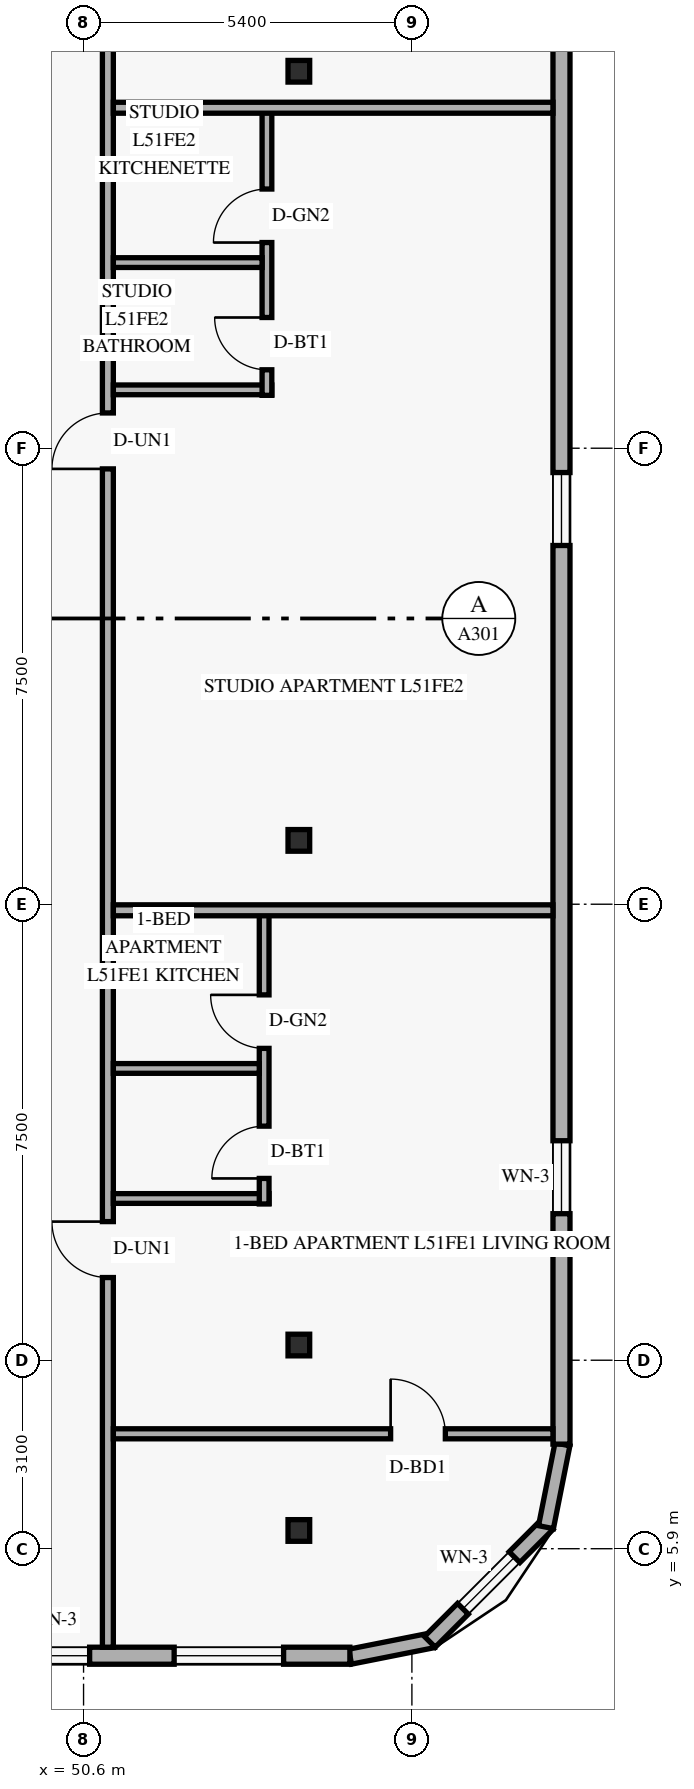
"""IFC4 building model, lengths in metres.
Left out: names, types, materials, properties, quantities, classifications, styles, units other than length and angle.
Written with IfcOpenShell. Run it as: python <this file> out.ifc"""

import sys

from ifc_helpers import new_model, si_unit, direction, frame, frame_2d, origin, origin_2d, place, context, subcontext, project, spatial, rectangle, hollow_rectangle, extrude, element, fill, save


model = new_model("IFC4")
c1 = context("Model", 3, precision=1e-05, world=origin(), true_north=direction((0.0, 1.0)))
c2 = subcontext(c1, "Body", "Model", "MODEL_VIEW")
j1 = project(units=[si_unit("LENGTHUNIT", "METRE"), si_unit("PLANEANGLEUNIT", "RADIAN")], contexts=[c1])
p1 = place(None, origin())
s1 = spatial("IfcSite", under=j1, at=p1, CompositionType="ELEMENT")
p2 = place(p1, origin())
s2 = spatial("IfcBuilding", under=s1, at=p2, CompositionType="ELEMENT")
p3 = place(p2, frame((0.0, 0.0, 196.2)))
s3 = spatial("IfcBuildingStorey", under=s2, at=p3, CompositionType="ELEMENT", Elevation=196.2)
for number, where, z_axis, x_axis in (
    (1, (54.036, 6.2, 0.0), (0.058, 0.0, 0.998), (0.0, 1.0, 0.0)),
    (2, (54.036, 9.25, 0.0), (0.058, 0.0, 0.998), (0.0, 1.0, 0.0)),
    (3, (54.036, 17.55, 0.0), (0.058, 0.0, 0.998), (0.0, 1.0, 0.0)),
    (4, (54.036, 30.2, 0.0), (0.058, 0.0, 0.998), (0.0, 1.0, 0.0)),
):
    element("IfcColumn", number, at=place(p3, frame(where, z_axis=z_axis, x_axis=x_axis)), inside=s3, PredefinedType="COLUMN", context=c2, shape_type="SweptSolid", body=[
        extrude(hollow_rectangle(XDim=0.356, YDim=0.356, WallThickness=0.016, at=origin_2d()), origin(), (0.0, 0.0, 1.0), 3.606),
    ])
p4 = place(p3, frame((54.983, 4.124, 0.0), z_axis=(0.0, 0.0, 1.0), x_axis=(0.980809899341, 0.19496651342, 0.0)))
e5 = element("IfcWall", 5, at=p4, inside=s3, PredefinedType="SOLIDWALL", context=c2, shape_type="SweptSolid", body=[
    extrude(rectangle(XDim=1.389, YDim=0.25, at=frame_2d((0.694, 0.0))), origin(), (0.0, 0.0, 1.0), 3.3),
])
p5 = place(p3, frame((56.295, 4.368, 0.0), z_axis=(0.0, 0.0, 1.0), x_axis=(0.707106781187, 0.707106781187, 0.0)))
e6 = element("IfcWall", 6, at=p5, inside=s3, PredefinedType="SOLIDWALL", context=c2, shape_type="SweptSolid", body=[
    extrude(rectangle(XDim=2.739, YDim=0.25, at=frame_2d((1.37, 0.0))), origin(), (0.0, 0.0, 1.0), 3.3),
])
p6 = place(p5, frame((0.77, 0.0, 0.85)))
e7 = element("IfcOpeningElement", 7, at=p6, cuts=e6, PredefinedType="OPENING", context=c2, shape_type="SweptSolid", body=[
    extrude(rectangle(XDim=1.2, YDim=1.5, at=frame_2d((0.6, 0.75))), frame((0.0, 0.135, 0.0), z_axis=(0.0, -1.0, 0.0), x_axis=(1.0, 0.0, 0.0)), (0.0, 0.0, 1.0), 0.27),
])
p7 = place(p3, frame((58.205, 6.254, 0.0), z_axis=(0.0, 0.0, 1.0), x_axis=(0.19496651342, 0.980809899341, 0.0)))
e8 = element("IfcWall", 8, at=p7, inside=s3, PredefinedType="SOLIDWALL", context=c2, shape_type="SweptSolid", body=[
    extrude(rectangle(XDim=1.389, YDim=0.25, at=frame_2d((0.694, 0.0))), origin(), (0.0, 0.0, 1.0), 3.3),
])
p8 = place(p3, frame((21.22, 4.14, 0.0), z_axis=(0.0, 0.0, 1.0), x_axis=(1.0, 0.0, 0.0)))
e9 = element("IfcWall", 9, at=p8, inside=s3, PredefinedType="SOLIDWALL", context=c2, shape_type="SweptSolid", body=[
    extrude(rectangle(XDim=33.76, YDim=0.28, at=frame_2d((16.88, 0.0))), origin(), (0.0, 0.0, 1.0), 3.3),
])
p9 = place(p8, frame((2.605, 0.0, 0.85)))
e10 = element("IfcOpeningElement", 10, at=p9, cuts=e9, PredefinedType="OPENING", context=c2, shape_type="SweptSolid", body=[
    extrude(rectangle(XDim=1.8, YDim=1.6, at=frame_2d((0.9, 0.8))), frame((0.0, 0.15, 0.0), z_axis=(0.0, -1.0, 0.0), x_axis=(1.0, 0.0, 0.0)), (0.0, 0.0, 1.0), 0.3),
])
p10 = place(p8, frame((9.49, 0.0, 0.85)))
e11 = element("IfcOpeningElement", 11, at=p10, cuts=e9, PredefinedType="OPENING", context=c2, shape_type="SweptSolid", body=[
    extrude(rectangle(XDim=1.8, YDim=1.6, at=frame_2d((0.9, 0.8))), frame((0.0, 0.15, 0.0), z_axis=(0.0, -1.0, 0.0), x_axis=(1.0, 0.0, 0.0)), (0.0, 0.0, 1.0), 0.3),
])
p11 = place(p8, frame((14.765, 0.0, 0.85)))
e12 = element("IfcOpeningElement", 12, at=p11, cuts=e9, PredefinedType="OPENING", context=c2, shape_type="SweptSolid", body=[
    extrude(rectangle(XDim=1.8, YDim=1.6, at=frame_2d((0.9, 0.8))), frame((0.0, 0.15, 0.0), z_axis=(0.0, -1.0, 0.0), x_axis=(1.0, 0.0, 0.0)), (0.0, 0.0, 1.0), 0.3),
])
p12 = place(p8, frame((19.16, 0.0, 0.85)))
e13 = element("IfcOpeningElement", 13, at=p12, cuts=e9, PredefinedType="OPENING", context=c2, shape_type="SweptSolid", body=[
    extrude(rectangle(XDim=1.8, YDim=1.6, at=frame_2d((0.9, 0.8))), frame((0.0, 0.15, 0.0), z_axis=(0.0, -1.0, 0.0), x_axis=(1.0, 0.0, 0.0)), (0.0, 0.0, 1.0), 0.3),
])
p13 = place(p8, frame((24.585, 0.0, 0.85)))
e14 = element("IfcOpeningElement", 14, at=p13, cuts=e9, PredefinedType="OPENING", context=c2, shape_type="SweptSolid", body=[
    extrude(rectangle(XDim=1.8, YDim=1.6, at=frame_2d((0.9, 0.8))), frame((0.0, 0.15, 0.0), z_axis=(0.0, -1.0, 0.0), x_axis=(1.0, 0.0, 0.0)), (0.0, 0.0, 1.0), 0.3),
])
p14 = place(p8, frame((28.28, 0.0, 0.85)))
e15 = element("IfcOpeningElement", 15, at=p14, cuts=e9, PredefinedType="OPENING", context=c2, shape_type="SweptSolid", body=[
    extrude(rectangle(XDim=1.2, YDim=1.5, at=frame_2d((0.6, 0.75))), frame((0.0, 0.15, 0.0), z_axis=(0.0, -1.0, 0.0), x_axis=(1.0, 0.0, 0.0)), (0.0, 0.0, 1.0), 0.3),
])
p15 = place(p8, frame((30.87, 0.0, 0.85)))
e16 = element("IfcOpeningElement", 16, at=p15, cuts=e9, PredefinedType="OPENING", context=c2, shape_type="SweptSolid", body=[
    extrude(rectangle(XDim=1.8, YDim=1.6, at=frame_2d((0.9, 0.8))), frame((0.0, 0.15, 0.0), z_axis=(0.0, -1.0, 0.0), x_axis=(1.0, 0.0, 0.0)), (0.0, 0.0, 1.0), 0.3),
])
p16 = place(p3, frame((58.46, 7.62, 0.0), z_axis=(0.0, 0.0, 1.0), x_axis=(0.0, 1.0, 0.0)))
e17 = element("IfcWall", 17, at=p16, inside=s3, PredefinedType="SOLIDWALL", context=c2, shape_type="SweptSolid", body=[
    extrude(rectangle(XDim=32.76, YDim=0.28, at=frame_2d((16.38, 0.0))), origin(), (0.0, 0.0, 1.0), 3.3),
])
p17 = place(p16, frame((3.79, 0.0, 0.85)))
e18 = element("IfcOpeningElement", 18, at=p17, cuts=e17, PredefinedType="OPENING", context=c2, shape_type="SweptSolid", body=[
    extrude(rectangle(XDim=1.2, YDim=1.5, at=frame_2d((0.6, 0.75))), frame((0.0, 0.15, 0.0), z_axis=(0.0, -1.0, 0.0), x_axis=(1.0, 0.0, 0.0)), (0.0, 0.0, 1.0), 0.3),
])
p18 = place(p16, frame((14.78, 0.0, 0.85)))
e19 = element("IfcOpeningElement", 19, at=p18, cuts=e17, PredefinedType="OPENING", context=c2, shape_type="SweptSolid", body=[
    extrude(rectangle(XDim=1.2, YDim=1.5, at=frame_2d((0.6, 0.75))), frame((0.0, 0.15, 0.0), z_axis=(0.0, -1.0, 0.0), x_axis=(1.0, 0.0, 0.0)), (0.0, 0.0, 1.0), 0.3),
])
p19 = place(p16, frame((26.77, 0.0, 0.85)))
e20 = element("IfcOpeningElement", 20, at=p19, cuts=e17, PredefinedType="OPENING", context=c2, shape_type="SweptSolid", body=[
    extrude(rectangle(XDim=1.2, YDim=1.5, at=frame_2d((0.6, 0.75))), frame((0.0, 0.15, 0.0), z_axis=(0.0, -1.0, 0.0), x_axis=(1.0, 0.0, 0.0)), (0.0, 0.0, 1.0), 0.3),
])
p20 = place(p3, frame((51.0, 4.28, 0.0), z_axis=(0.0, 0.0, 1.0), x_axis=(0.0, 1.0, 0.0)))
e21 = element("IfcWall", 21, at=p20, inside=s3, PredefinedType="STANDARD", context=c2, shape_type="SweptSolid", body=[
    extrude(rectangle(XDim=39.44, YDim=0.18, at=frame_2d((19.72, 0.0))), origin(), (0.0, 0.0, 1.0), 2.67),
])
p21 = place(p20, frame((6.08, 0.0, 0.0)))
e22 = element("IfcOpeningElement", 22, at=p21, cuts=e21, PredefinedType="OPENING", context=c2, shape_type="SweptSolid", body=[
    extrude(rectangle(XDim=0.92, YDim=2.15, at=frame_2d((0.46, 1.075))), frame((0.0, 0.1, 0.0), z_axis=(0.0, -1.0, 0.0), x_axis=(1.0, 0.0, 0.0)), (0.0, 0.0, 1.0), 0.2),
])
p22 = place(p20, frame((19.38, 0.0, 0.0)))
e23 = element("IfcOpeningElement", 23, at=p22, cuts=e21, PredefinedType="OPENING", context=c2, shape_type="SweptSolid", body=[
    extrude(rectangle(XDim=0.92, YDim=2.15, at=frame_2d((0.46, 1.075))), frame((0.0, 0.1, 0.0), z_axis=(0.0, -1.0, 0.0), x_axis=(1.0, 0.0, 0.0)), (0.0, 0.0, 1.0), 0.2),
])
p23 = place(p20, frame((31.534, 0.0, 0.0)))
e24 = element("IfcOpeningElement", 24, at=p23, cuts=e21, PredefinedType="OPENING", context=c2, shape_type="SweptSolid", body=[
    extrude(rectangle(XDim=0.92, YDim=2.15, at=frame_2d((0.46, 1.075))), frame((0.0, 0.1, 0.0), z_axis=(0.0, -1.0, 0.0), x_axis=(1.0, 0.0, 0.0)), (0.0, 0.0, 1.0), 0.2),
])
p24 = place(p3, frame((51.09, 7.79, 0.0), z_axis=(0.0, 0.0, 1.0), x_axis=(1.0, 0.0, 0.0)))
e25 = element("IfcWall", 25, at=p24, inside=s3, PredefinedType="PARTITIONING", context=c2, shape_type="SweptSolid", body=[
    extrude(rectangle(XDim=7.23, YDim=0.165, at=frame_2d((3.615, 0.0))), origin(), (0.0, 0.0, 1.0), 2.819),
])
p25 = place(p24, frame((4.56, 0.0, 0.0)))
e26 = element("IfcOpeningElement", 26, at=p25, cuts=e25, PredefinedType="OPENING", context=c2, shape_type="SweptSolid", body=[
    extrude(rectangle(XDim=0.9, YDim=2.14, at=frame_2d((0.45, 1.07))), frame((0.0, 0.093, 0.0), z_axis=(0.0, -1.0, 0.0), x_axis=(1.0, 0.0, 0.0)), (0.0, 0.0, 1.0), 0.185),
])
p26 = place(p3, frame((51.09, 11.66, 0.0), z_axis=(0.0, 0.0, 1.0), x_axis=(1.0, 0.0, 0.0)))
e27 = element("IfcWall", 27, at=p26, inside=s3, PredefinedType="PLUMBINGWALL", context=c2, shape_type="SweptSolid", body=[
    extrude(rectangle(XDim=2.56, YDim=0.16, at=frame_2d((1.28, 0.0))), origin(), (0.0, 0.0, 1.0), 3.3),
])
p27 = place(p3, frame((53.57, 11.57, 0.0), z_axis=(0.0, 0.0, 1.0), x_axis=(0.0, 1.0, 0.0)))
e28 = element("IfcWall", 28, at=p27, inside=s3, PredefinedType="PLUMBINGWALL", context=c2, shape_type="SweptSolid", body=[
    extrude(rectangle(XDim=4.83, YDim=0.16, at=frame_2d((2.415, 0.0))), origin(), (0.0, 0.0, 1.0), 2.924),
])
p28 = place(p27, frame((0.42, 0.0, 0.0)))
e29 = element("IfcOpeningElement", 29, at=p28, cuts=e28, PredefinedType="OPENING", context=c2, shape_type="SweptSolid", body=[
    extrude(rectangle(XDim=0.86, YDim=2.12, at=frame_2d((0.43, 1.06))), frame((0.0, 0.09, 0.0), z_axis=(0.0, -1.0, 0.0), x_axis=(1.0, 0.0, 0.0)), (0.0, 0.0, 1.0), 0.18),
])
p29 = place(p27, frame((2.559, 0.0, 0.0)))
e30 = element("IfcOpeningElement", 30, at=p29, cuts=e28, PredefinedType="OPENING", context=c2, shape_type="SweptSolid", body=[
    extrude(rectangle(XDim=0.88, YDim=2.12, at=frame_2d((0.44, 1.06))), frame((0.0, 0.09, 0.0), z_axis=(0.0, -1.0, 0.0), x_axis=(1.0, 0.0, 0.0)), (0.0, 0.0, 1.0), 0.18),
])
p30 = place(p3, frame((51.09, 13.799, 0.0), z_axis=(0.0, 0.0, 1.0), x_axis=(1.0, 0.0, 0.0)))
e31 = element("IfcWall", 31, at=p30, inside=s3, PredefinedType="PLUMBINGWALL", context=c2, shape_type="SweptSolid", body=[
    extrude(rectangle(XDim=2.4, YDim=0.16, at=frame_2d((1.2, 0.0))), origin(), (0.0, 0.0, 1.0), 3.3),
])
p31 = place(p3, frame((51.09, 16.4, 0.0), z_axis=(0.0, 0.0, 1.0), x_axis=(1.0, 0.0, 0.0)))
e32 = element("IfcWall", 32, at=p31, inside=s3, PredefinedType="PARTITIONING", context=c2, shape_type="SweptSolid", body=[
    extrude(rectangle(XDim=7.23, YDim=0.18, at=frame_2d((3.615, 0.0))), origin(), (0.0, 0.0, 1.0), 2.819),
])
p32 = place(p3, frame((51.09, 24.96, 0.0), z_axis=(0.0, 0.0, 1.0), x_axis=(1.0, 0.0, 0.0)))
e33 = element("IfcWall", 33, at=p32, inside=s3, PredefinedType="PLUMBINGWALL", context=c2, shape_type="SweptSolid", body=[
    extrude(rectangle(XDim=2.606, YDim=0.16, at=frame_2d((1.303, 0.0))), origin(), (0.0, 0.0, 1.0), 2.743),
])
p33 = place(p3, frame((53.616, 24.87, 0.0), z_axis=(0.0, 0.0, 1.0), x_axis=(0.0, 1.0, 0.0)))
e34 = element("IfcWall", 34, at=p33, inside=s3, PredefinedType="PLUMBINGWALL", context=c2, shape_type="SweptSolid", body=[
    extrude(rectangle(XDim=4.73, YDim=0.16, at=frame_2d((2.365, 0.0))), origin(), (0.0, 0.0, 1.0), 2.743),
])
p34 = place(p33, frame((0.42, 0.0, 0.0)))
e35 = element("IfcOpeningElement", 35, at=p34, cuts=e34, PredefinedType="OPENING", context=c2, shape_type="SweptSolid", body=[
    extrude(rectangle(XDim=0.86, YDim=2.12, at=frame_2d((0.43, 1.06))), frame((0.0, 0.09, 0.0), z_axis=(0.0, -1.0, 0.0), x_axis=(1.0, 0.0, 0.0)), (0.0, 0.0, 1.0), 0.18),
])
p35 = place(p33, frame((2.513, 0.0, 0.0)))
e36 = element("IfcOpeningElement", 36, at=p35, cuts=e34, PredefinedType="OPENING", context=c2, shape_type="SweptSolid", body=[
    extrude(rectangle(XDim=0.88, YDim=2.12, at=frame_2d((0.44, 1.06))), frame((0.0, 0.09, 0.0), z_axis=(0.0, -1.0, 0.0), x_axis=(1.0, 0.0, 0.0)), (0.0, 0.0, 1.0), 0.18),
])
p36 = place(p3, frame((51.09, 27.053, 0.0), z_axis=(0.0, 0.0, 1.0), x_axis=(1.0, 0.0, 0.0)))
e37 = element("IfcWall", 37, at=p36, inside=s3, PredefinedType="PLUMBINGWALL", context=c2, shape_type="SweptSolid", body=[
    extrude(rectangle(XDim=2.446, YDim=0.16, at=frame_2d((1.223, 0.0))), origin(), (0.0, 0.0, 1.0), 2.743),
])
p37 = place(p3, frame((51.09, 29.6, 0.0), z_axis=(0.0, 0.0, 1.0), x_axis=(1.0, 0.0, 0.0)))
e38 = element("IfcWall", 38, at=p37, inside=s3, PredefinedType="PARTITIONING", context=c2, shape_type="SweptSolid", body=[
    extrude(rectangle(XDim=7.23, YDim=0.18, at=frame_2d((3.615, 0.0))), origin(), (0.0, 0.0, 1.0), 2.743),
])
p38 = place(p6, origin())
e39 = element("IfcWindow", 39, at=p38, inside=s3, PartitioningType="SINGLE_PANEL", PredefinedType="WINDOW", context=c2, shape_type="SweptSolid", body=[
    extrude(rectangle(XDim=1.2, YDim=1.5, at=frame_2d((0.6, 0.75))), frame((0.0, 0.03, 0.0), z_axis=(0.0, -1.0, 0.0), x_axis=(1.0, 0.0, 0.0)), (0.0, 0.0, 1.0), 0.06),
])
fill(e7, e39)
p39 = place(p14, origin())
e40 = element("IfcWindow", 40, at=p39, inside=s3, PartitioningType="SINGLE_PANEL", PredefinedType="WINDOW", context=c2, shape_type="SweptSolid", body=[
    extrude(rectangle(XDim=1.2, YDim=1.5, at=frame_2d((0.6, 0.75))), frame((0.0, 0.03, 0.0), z_axis=(0.0, -1.0, 0.0), x_axis=(1.0, 0.0, 0.0)), (0.0, 0.0, 1.0), 0.06),
])
fill(e15, e40)
p40 = place(p15, origin())
e41 = element("IfcWindow", 41, at=p40, inside=s3, PartitioningType="SINGLE_PANEL", PredefinedType="WINDOW", context=c2, shape_type="SweptSolid", body=[
    extrude(rectangle(XDim=1.8, YDim=1.6, at=frame_2d((0.9, 0.8))), frame((0.0, 0.03, 0.0), z_axis=(0.0, -1.0, 0.0), x_axis=(1.0, 0.0, 0.0)), (0.0, 0.0, 1.0), 0.06),
])
fill(e16, e41)
p41 = place(p17, origin())
e42 = element("IfcWindow", 42, at=p41, inside=s3, PartitioningType="SINGLE_PANEL", PredefinedType="WINDOW", context=c2, shape_type="SweptSolid", body=[
    extrude(rectangle(XDim=1.2, YDim=1.5, at=frame_2d((0.6, 0.75))), frame((0.0, 0.03, 0.0), z_axis=(0.0, -1.0, 0.0), x_axis=(1.0, 0.0, 0.0)), (0.0, 0.0, 1.0), 0.06),
])
fill(e18, e42)
p42 = place(p18, origin())
e43 = element("IfcWindow", 43, at=p42, inside=s3, PartitioningType="SINGLE_PANEL", PredefinedType="WINDOW", context=c2, shape_type="SweptSolid", body=[
    extrude(rectangle(XDim=1.2, YDim=1.5, at=frame_2d((0.6, 0.75))), frame((0.0, 0.03, 0.0), z_axis=(0.0, -1.0, 0.0), x_axis=(1.0, 0.0, 0.0)), (0.0, 0.0, 1.0), 0.06),
])
fill(e19, e43)
p43 = place(p21, origin())
e44 = element("IfcDoor", 44, at=p43, inside=s3, OperationType="SINGLE_SWING_RIGHT", PredefinedType="DOOR", context=c2, shape_type="SweptSolid", body=[
    extrude(rectangle(XDim=0.92, YDim=2.15, at=frame_2d((0.46, 1.075))), frame((0.0, 0.025, 0.0), z_axis=(0.0, -1.0, 0.0), x_axis=(1.0, 0.0, 0.0)), (0.0, 0.0, 1.0), 0.05),
])
fill(e22, e44)
p44 = place(p28, origin())
e45 = element("IfcDoor", 45, at=p44, inside=s3, OperationType="SINGLE_SWING_LEFT", PredefinedType="DOOR", context=c2, shape_type="SweptSolid", body=[
    extrude(rectangle(XDim=0.86, YDim=2.12, at=frame_2d((0.43, 1.06))), frame((0.0, 0.025, 0.0), z_axis=(0.0, -1.0, 0.0), x_axis=(1.0, 0.0, 0.0)), (0.0, 0.0, 1.0), 0.05),
])
fill(e29, e45)
p45 = place(p29, origin())
e46 = element("IfcDoor", 46, at=p45, inside=s3, OperationType="SINGLE_SWING_RIGHT", PredefinedType="DOOR", context=c2, shape_type="SweptSolid", body=[
    extrude(rectangle(XDim=0.88, YDim=2.12, at=frame_2d((0.44, 1.06))), frame((0.0, 0.025, 0.0), z_axis=(0.0, -1.0, 0.0), x_axis=(1.0, 0.0, 0.0)), (0.0, 0.0, 1.0), 0.05),
])
fill(e30, e46)
p46 = place(p25, origin())
e47 = element("IfcDoor", 47, at=p46, inside=s3, OperationType="SINGLE_SWING_LEFT", PredefinedType="DOOR", context=c2, shape_type="SweptSolid", body=[
    extrude(rectangle(XDim=0.9, YDim=2.14, at=frame_2d((0.45, 1.07))), frame((0.0, 0.025, 0.0), z_axis=(0.0, -1.0, 0.0), x_axis=(1.0, 0.0, 0.0)), (0.0, 0.0, 1.0), 0.05),
])
fill(e26, e47)
p47 = place(p22, origin())
e48 = element("IfcDoor", 48, at=p47, inside=s3, OperationType="SINGLE_SWING_LEFT", PredefinedType="DOOR", context=c2, shape_type="SweptSolid", body=[
    extrude(rectangle(XDim=0.92, YDim=2.15, at=frame_2d((0.46, 1.075))), frame((0.0, 0.025, 0.0), z_axis=(0.0, -1.0, 0.0), x_axis=(1.0, 0.0, 0.0)), (0.0, 0.0, 1.0), 0.05),
])
fill(e23, e48)
p48 = place(p34, origin())
e49 = element("IfcDoor", 49, at=p48, inside=s3, OperationType="SINGLE_SWING_RIGHT", PredefinedType="DOOR", context=c2, shape_type="SweptSolid", body=[
    extrude(rectangle(XDim=0.86, YDim=2.12, at=frame_2d((0.43, 1.06))), frame((0.0, 0.025, 0.0), z_axis=(0.0, -1.0, 0.0), x_axis=(1.0, 0.0, 0.0)), (0.0, 0.0, 1.0), 0.05),
])
fill(e35, e49)
p49 = place(p35, origin())
e50 = element("IfcDoor", 50, at=p49, inside=s3, OperationType="SINGLE_SWING_LEFT", PredefinedType="DOOR", context=c2, shape_type="SweptSolid", body=[
    extrude(rectangle(XDim=0.88, YDim=2.12, at=frame_2d((0.44, 1.06))), frame((0.0, 0.025, 0.0), z_axis=(0.0, -1.0, 0.0), x_axis=(1.0, 0.0, 0.0)), (0.0, 0.0, 1.0), 0.05),
])
fill(e36, e50)
save(model, sys.argv[1])
